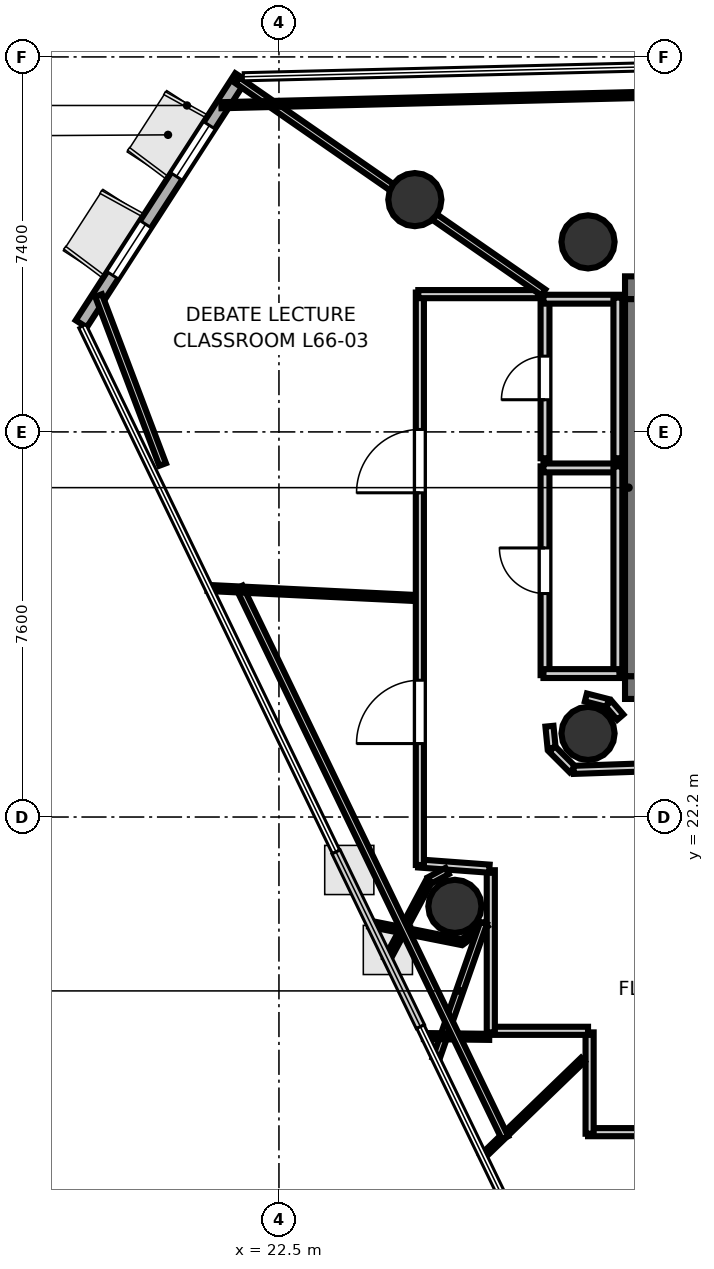
"""IFC4 building model, lengths in metres.
Left out: names, types, materials, properties, quantities, classifications, styles, units other than length and angle.
Written with IfcOpenShell. Run it as: python <this file> out.ifc"""

import sys

from ifc_helpers import new_model, si_unit, direction, frame, frame_2d, origin, origin_2d, place, context, subcontext, project, spatial, rectangle, hollow_circle, extrude, element, fill, save


model = new_model("IFC4")
c1 = context("Model", 3, precision=1e-05, world=origin(), true_north=direction((0.0, 1.0)))
c2 = subcontext(c1, "Body", "Model", "MODEL_VIEW")
j1 = project(units=[si_unit("LENGTHUNIT", "METRE"), si_unit("PLANEANGLEUNIT", "RADIAN")], contexts=[c1])
p1 = place(None, origin())
s1 = spatial("IfcSite", under=j1, at=p1, CompositionType="ELEMENT")
p2 = place(p1, origin())
s2 = spatial("IfcBuilding", under=s1, at=p2, CompositionType="ELEMENT")
p3 = place(p2, frame((0.0, 0.0, 257.5)))
s3 = spatial("IfcBuildingStorey", under=s2, at=p3, CompositionType="ELEMENT", Elevation=257.5)
p4 = place(p3, frame((29.33, 32.645, 0.0), z_axis=(0.0, 0.0, 1.0), x_axis=(1.0, 0.0, 0.0)))
e1 = element("IfcWall", 1, at=p4, inside=s3, PredefinedType="SHEAR", context=c2, shape_type="SweptSolid", body=[
    extrude(rectangle(XDim=10.52, YDim=0.45, at=frame_2d((5.26, 0.0))), origin(), (0.0, 0.0, 1.0), 3.52),
])
p5 = place(p4, frame((0.895, 0.0, 0.0)))
e2 = element("IfcOpeningElement", 2, at=p5, cuts=e1, PredefinedType="OPENING", context=c2, shape_type="SweptSolid", body=[
    extrude(rectangle(XDim=1.25, YDim=2.15, at=frame_2d((0.625, 1.075))), frame((0.0, 0.235, 0.0), z_axis=(0.0, -1.0, 0.0), x_axis=(1.0, 0.0, 0.0)), (0.0, 0.0, 1.0), 0.47),
])
p6 = place(p3, frame((29.33, 24.755, 0.0), z_axis=(0.0, 0.0, 1.0), x_axis=(1.0, 0.0, 0.0)))
e3 = element("IfcWall", 3, at=p6, inside=s3, PredefinedType="SHEAR", context=c2, shape_type="SweptSolid", body=[
    extrude(rectangle(XDim=10.52, YDim=0.45, at=frame_2d((5.26, 0.0))), origin(), (0.0, 0.0, 1.0), 3.52),
])
p7 = place(p6, frame((0.695, 0.0, 0.0)))
e4 = element("IfcOpeningElement", 4, at=p7, cuts=e3, PredefinedType="OPENING", context=c2, shape_type="SweptSolid", body=[
    extrude(rectangle(XDim=1.25, YDim=2.15, at=frame_2d((0.625, 1.075))), frame((0.0, 0.235, 0.0), z_axis=(0.0, -1.0, 0.0), x_axis=(1.0, 0.0, 0.0)), (0.0, 0.0, 1.0), 0.47),
])
p8 = place(p3, frame((29.555, 24.98, 0.0), z_axis=(0.0, 0.0, 1.0), x_axis=(0.0, 1.0, 0.0)))
e5 = element("IfcWall", 5, at=p8, inside=s3, PredefinedType="SHEAR", context=c2, shape_type="SweptSolid", body=[
    extrude(rectangle(XDim=7.44, YDim=0.45, at=frame_2d((3.72, 0.0))), origin(), (0.0, 0.0, 1.0), 3.52),
])
for number, where, z_axis, x_axis in (
    (6, (28.6, 33.55, 0.0), (0.0, 0.0, 1.0), (1.0, 0.0, 0.0)),
    (7, (28.6, 23.85, 0.0), (0.0, 0.0, 1.0), (1.0, 0.0, 0.0)),
    (8, (25.182, 34.384, 0.0), (0.0, 0.0, 1.0), (1.0, 0.0, 0.0)),
    (9, (25.972, 20.437, 0.0), (0.0, 0.0, 1.0), (1.0, 0.0, 0.0)),
):
    element("IfcColumn", number, at=place(p3, frame(where, z_axis=z_axis, x_axis=x_axis)), inside=s3, PredefinedType="COLUMN", context=c2, shape_type="SweptSolid", body=[
        extrude(hollow_circle(Radius=0.525, WallThickness=0.028, at=origin_2d()), origin(), (0.0, 0.0, 1.0), 3.7),
    ])
p9 = place(p3, frame((21.747, 36.807, 0.0), z_axis=(0.0, 0.0, 1.0), x_axis=(-0.542495743592, -0.84005855045, 0.0)))
e10 = element("IfcWall", 10, at=p9, inside=s3, PredefinedType="SOLIDWALL", context=c2, shape_type="SweptSolid", body=[
    extrude(rectangle(XDim=5.803, YDim=0.26, at=frame_2d((2.902, 0.0))), origin(), (0.0, 0.0, 1.0), 3.52),
])
p10 = place(p9, frame((1.141, 0.0, 0.9)))
e11 = element("IfcOpeningElement", 11, at=p10, cuts=e10, PredefinedType="OPENING", context=c2, shape_type="SweptSolid", body=[
    extrude(rectangle(XDim=1.2, YDim=2.0, at=frame_2d((0.6, 1.0))), frame((0.0, 0.14, 0.0), z_axis=(0.0, -1.0, 0.0), x_axis=(1.0, 0.0, 0.0)), (0.0, 0.0, 1.0), 0.28),
])
p11 = place(p9, frame((3.462, 0.0, 0.9)))
e12 = element("IfcOpeningElement", 12, at=p11, cuts=e10, PredefinedType="OPENING", context=c2, shape_type="SweptSolid", body=[
    extrude(rectangle(XDim=1.2, YDim=2.0, at=frame_2d((0.6, 1.0))), frame((0.0, 0.14, 0.0), z_axis=(0.0, -1.0, 0.0), x_axis=(1.0, 0.0, 0.0)), (0.0, 0.0, 1.0), 0.28),
])
p12 = place(p3, frame((27.751, 25.0, 0.0), z_axis=(0.0, 0.0, 1.0), x_axis=(0.0, 1.0, 0.0)))
e13 = element("IfcWall", 13, at=p12, inside=s3, PredefinedType="PLUMBINGWALL", context=c2, shape_type="SweptSolid", body=[
    extrude(rectangle(XDim=4.12, YDim=0.175, at=frame_2d((2.06, 0.0))), origin(), (0.0, 0.0, 1.0), 2.84),
])
p13 = place(p12, frame((1.61, 0.0, 0.0)))
e14 = element("IfcOpeningElement", 14, at=p13, cuts=e13, PredefinedType="OPENING", context=c2, shape_type="SweptSolid", body=[
    extrude(rectangle(XDim=0.9, YDim=2.1, at=frame_2d((0.45, 1.05))), frame((0.0, 0.097, 0.0), z_axis=(0.0, -1.0, 0.0), x_axis=(1.0, 0.0, 0.0)), (0.0, 0.0, 1.0), 0.195),
])
p14 = place(p3, frame((27.72, 29.089, 0.0), z_axis=(0.0, 0.0, 1.0), x_axis=(1.0, 0.0, 0.0)))
e15 = element("IfcWall", 15, at=p14, inside=s3, PredefinedType="PLUMBINGWALL", context=c2, shape_type="SweptSolid", body=[
    extrude(rectangle(XDim=1.5, YDim=0.175, at=frame_2d((0.75, 0.0))), origin(), (0.0, 0.0, 1.0), 2.84),
])
p15 = place(p3, frame((29.189, 29.12, 0.0), z_axis=(0.0, 0.0, 1.0), x_axis=(0.0, -1.0, 0.0)))
e16 = element("IfcWall", 16, at=p15, inside=s3, PredefinedType="PLUMBINGWALL", context=c2, shape_type="SweptSolid", body=[
    extrude(rectangle(XDim=4.12, YDim=0.175, at=frame_2d((2.06, 0.0))), origin(), (0.0, 0.0, 1.0), 2.84),
])
p16 = place(p3, frame((29.22, 25.031, 0.0), z_axis=(0.0, 0.0, 1.0), x_axis=(-1.0, 0.0, 0.0)))
e17 = element("IfcWall", 17, at=p16, inside=s3, PredefinedType="PLUMBINGWALL", context=c2, shape_type="SweptSolid", body=[
    extrude(rectangle(XDim=1.5, YDim=0.175, at=frame_2d((0.75, 0.0))), origin(), (0.0, 0.0, 1.0), 2.84),
])
p17 = place(p3, frame((27.751, 29.28, 0.0), z_axis=(0.0, 0.0, 1.0), x_axis=(0.0, 1.0, 0.0)))
e18 = element("IfcWall", 18, at=p17, inside=s3, PredefinedType="PLUMBINGWALL", context=c2, shape_type="SweptSolid", body=[
    extrude(rectangle(XDim=3.17, YDim=0.175, at=frame_2d((1.585, 0.0))), origin(), (0.0, 0.0, 1.0), 2.84),
])
p18 = place(p17, frame((1.155, 0.0, 0.0)))
e19 = element("IfcOpeningElement", 19, at=p18, cuts=e18, PredefinedType="OPENING", context=c2, shape_type="SweptSolid", body=[
    extrude(rectangle(XDim=0.86, YDim=2.05, at=frame_2d((0.43, 1.025))), frame((0.0, 0.097, 0.0), z_axis=(0.0, -1.0, 0.0), x_axis=(1.0, 0.0, 0.0)), (0.0, 0.0, 1.0), 0.195),
])
p19 = place(p3, frame((27.72, 32.419, 0.0), z_axis=(0.0, 0.0, 1.0), x_axis=(1.0, 0.0, 0.0)))
e20 = element("IfcWall", 20, at=p19, inside=s3, PredefinedType="PLUMBINGWALL", context=c2, shape_type="SweptSolid", body=[
    extrude(rectangle(XDim=1.5, YDim=0.175, at=frame_2d((0.75, 0.0))), origin(), (0.0, 0.0, 1.0), 2.84),
])
p20 = place(p3, frame((29.189, 32.45, 0.0), z_axis=(0.0, 0.0, 1.0), x_axis=(0.0, -1.0, 0.0)))
e21 = element("IfcWall", 21, at=p20, inside=s3, PredefinedType="PLUMBINGWALL", context=c2, shape_type="SweptSolid", body=[
    extrude(rectangle(XDim=3.17, YDim=0.175, at=frame_2d((1.585, 0.0))), origin(), (0.0, 0.0, 1.0), 2.84),
])
p21 = place(p3, frame((29.236, 24.17, 0.0), z_axis=(0.0, 0.0, 1.0), x_axis=(-0.652260263346, 0.757995084984, 0.0)))
e22 = element("IfcWall", 22, at=p21, inside=s3, PredefinedType="PARTITIONING", context=c2, shape_type="SweptSolid", body=[
    extrude(rectangle(XDim=0.355, YDim=0.16, at=frame_2d((0.178, 0.0))), origin(), (0.0, 0.0, 1.0), 2.84),
])
p22 = place(p3, frame((28.988, 24.45, 0.0), z_axis=(0.0, 0.0, 1.0), x_axis=(-0.968704505916, 0.248216800836, 0.0)))
e23 = element("IfcWall", 23, at=p22, inside=s3, PredefinedType="PARTITIONING", context=c2, shape_type="SweptSolid", body=[
    extrude(rectangle(XDim=0.445, YDim=0.16, at=frame_2d((0.222, 0.0))), origin(), (0.0, 0.0, 1.0), 2.84),
])
p23 = place(p3, frame((27.838, 23.992, 0.0), z_axis=(0.0, 0.0, 1.0), x_axis=(0.098273407977, -0.995159453196, 0.0)))
e24 = element("IfcWall", 24, at=p23, inside=s3, PredefinedType="PARTITIONING", context=c2, shape_type="SweptSolid", body=[
    extrude(rectangle(XDim=0.432, YDim=0.16, at=frame_2d((0.216, 0.0))), origin(), (0.0, 0.0, 1.0), 2.84),
])
p24 = place(p3, frame((27.89, 23.543, 0.0), z_axis=(0.0, 0.0, 1.0), x_axis=(0.707106781187, -0.707106781187, 0.0)))
e25 = element("IfcWall", 25, at=p24, inside=s3, PredefinedType="PARTITIONING", context=c2, shape_type="SweptSolid", body=[
    extrude(rectangle(XDim=0.57, YDim=0.16, at=frame_2d((0.285, 0.0))), origin(), (0.0, 0.0, 1.0), 2.84),
])
p25 = place(p3, frame((28.316, 23.131, 0.0), z_axis=(0.0, 0.0, 1.0), x_axis=(0.999405342193, 0.034481328227, 0.0)))
e26 = element("IfcWall", 26, at=p25, inside=s3, PredefinedType="PARTITIONING", context=c2, shape_type="SweptSolid", body=[
    extrude(rectangle(XDim=1.324, YDim=0.16, at=frame_2d((0.662, 0.0))), origin(), (0.0, 0.0, 1.0), 2.84),
])
p26 = place(p3, frame((43.731, 15.981, 0.0), z_axis=(0.0, 0.0, 1.0), x_axis=(-1.0, 0.0, 0.0)))
e27 = element("IfcWall", 27, at=p26, inside=s3, PredefinedType="PARTITIONING", context=c2, shape_type="SweptSolid", body=[
    extrude(rectangle(XDim=15.131, YDim=0.16, at=frame_2d((7.565, 0.0))), origin(), (0.0, 0.0, 1.0), 2.84),
])
p27 = place(p26, frame((6.965, 0.0, 0.0)))
e28 = element("IfcOpeningElement", 28, at=p27, cuts=e27, PredefinedType="OPENING", context=c2, shape_type="SweptSolid", body=[
    extrude(rectangle(XDim=1.25, YDim=2.2, at=frame_2d((0.625, 1.1))), frame((0.0, 0.09, 0.0), z_axis=(0.0, -1.0, 0.0), x_axis=(1.0, 0.0, 0.0)), (0.0, 0.0, 1.0), 0.18),
])
p28 = place(p3, frame((28.631, 15.95, 0.0), z_axis=(0.0, 0.0, 1.0), x_axis=(0.0, 1.0, 0.0)))
e29 = element("IfcWall", 29, at=p28, inside=s3, PredefinedType="PARTITIONING", context=c2, shape_type="SweptSolid", body=[
    extrude(rectangle(XDim=2.0, YDim=0.16, at=frame_2d((1.0, 0.0))), origin(), (0.0, 0.0, 1.0), 2.84),
])
p29 = place(p3, frame((28.6, 17.981, 0.0), z_axis=(0.0, 0.0, 1.0), x_axis=(-1.0, 0.0, 0.0)))
e30 = element("IfcWall", 30, at=p29, inside=s3, PredefinedType="PARTITIONING", context=c2, shape_type="SweptSolid", body=[
    extrude(rectangle(XDim=1.95, YDim=0.16, at=frame_2d((0.975, 0.0))), origin(), (0.0, 0.0, 1.0), 2.84),
])
p30 = place(p3, frame((26.681, 17.95, 0.0), z_axis=(0.0, 0.0, 1.0), x_axis=(0.0, 1.0, 0.0)))
e31 = element("IfcWall", 31, at=p30, inside=s3, PredefinedType="PARTITIONING", context=c2, shape_type="SweptSolid", body=[
    extrude(rectangle(XDim=3.2, YDim=0.16, at=frame_2d((1.6, 0.0))), origin(), (0.0, 0.0, 1.0), 2.84),
])
p31 = place(p3, frame((26.652, 21.181, 0.0), z_axis=(0.0, 0.0, 1.0), x_axis=(-0.997303696291, 0.073384857861, 0.0)))
e32 = element("IfcWall", 32, at=p31, inside=s3, PredefinedType="PARTITIONING", context=c2, shape_type="SweptSolid", body=[
    extrude(rectangle(XDim=1.404, YDim=0.16, at=frame_2d((0.702, 0.0))), origin(), (0.0, 0.0, 1.0), 2.84),
])
p32 = place(p3, frame((25.281, 21.253, 0.0), z_axis=(0.0, 0.0, 1.0), x_axis=(0.0, 1.0, 0.0)))
e33 = element("IfcWall", 33, at=p32, inside=s3, PredefinedType="PARTITIONING", context=c2, shape_type="SweptSolid", body=[
    extrude(rectangle(XDim=11.297, YDim=0.16, at=frame_2d((5.648, 0.0))), origin(), (0.0, 0.0, 1.0), 2.84),
])
p33 = place(p32, frame((2.396, 0.0, 0.0)))
e34 = element("IfcOpeningElement", 34, at=p33, cuts=e33, PredefinedType="OPENING", context=c2, shape_type="SweptSolid", body=[
    extrude(rectangle(XDim=1.25, YDim=2.2, at=frame_2d((0.625, 1.1))), frame((0.0, 0.09, 0.0), z_axis=(0.0, -1.0, 0.0), x_axis=(1.0, 0.0, 0.0)), (0.0, 0.0, 1.0), 0.18),
])
p34 = place(p32, frame((7.345, 0.0, 0.0)))
e35 = element("IfcOpeningElement", 35, at=p34, cuts=e33, PredefinedType="OPENING", context=c2, shape_type="SweptSolid", body=[
    extrude(rectangle(XDim=1.25, YDim=2.2, at=frame_2d((0.625, 1.1))), frame((0.0, 0.09, 0.0), z_axis=(0.0, -1.0, 0.0), x_axis=(1.0, 0.0, 0.0)), (0.0, 0.0, 1.0), 0.18),
])
p35 = place(p3, frame((25.25, 32.519, 0.0), z_axis=(0.0, 0.0, 1.0), x_axis=(1.0, 0.0, 0.0)))
e36 = element("IfcWall", 36, at=p35, inside=s3, PredefinedType="PARTITIONING", context=c2, shape_type="SweptSolid", body=[
    extrude(rectangle(XDim=2.37, YDim=0.16, at=frame_2d((1.185, 0.0))), origin(), (0.0, 0.0, 1.0), 2.84),
])
p36 = place(p3, frame((25.819, 21.135, 0.0), z_axis=(0.0, 0.0, 1.0), x_axis=(-0.880749970322, -0.473581555571, 0.0)))
e37 = element("IfcWall", 37, at=p36, inside=s3, PredefinedType="PARTITIONING", context=c2, shape_type="SweptSolid", body=[
    extrude(rectangle(XDim=0.393, YDim=0.14, at=frame_2d((0.197, 0.0))), origin(), (0.0, 0.0, 1.0), 2.84),
])
p37 = place(p3, frame((25.46, 20.936, 0.0), z_axis=(0.0, 0.0, 1.0), x_axis=(-0.471491142695, -0.881870796863, 0.0)))
e38 = element("IfcWall", 38, at=p37, inside=s3, PredefinedType="PARTITIONING", context=c2, shape_type="SweptSolid", body=[
    extrude(rectangle(XDim=1.754, YDim=0.12, at=frame_2d((0.877, 0.0))), origin(), (0.0, 0.0, 1.0), 2.84),
])
p38 = place(p3, frame((24.294, 20.094, 0.0), z_axis=(0.0, 0.0, 1.0), x_axis=(0.980819637786, -0.194917516229, 0.0)))
e39 = element("IfcWall", 39, at=p38, inside=s3, PredefinedType="PARTITIONING", context=c2, shape_type="SweptSolid", body=[
    extrude(rectangle(XDim=1.841, YDim=0.12, at=frame_2d((0.921, 0.0))), origin(), (0.0, 0.0, 1.0), 2.84),
])
p39 = place(p3, frame((26.124, 19.74, 0.0), z_axis=(0.0, 0.0, 1.0), x_axis=(0.803130617249, 0.595802997339, 0.0)))
e40 = element("IfcWall", 40, at=p39, inside=s3, PredefinedType="PARTITIONING", context=c2, shape_type="SweptSolid", body=[
    extrude(rectangle(XDim=0.578, YDim=0.105, at=frame_2d((0.289, 0.0))), origin(), (0.0, 0.0, 1.0), 2.84),
])
p40 = place(p3, frame((26.539, 20.109, 0.0), z_axis=(0.0, 0.0, 1.0), x_axis=(-0.331161515891, -0.94357408315, 0.0)))
e41 = element("IfcWall", 41, at=p40, inside=s3, PredefinedType="PARTITIONING", context=c2, shape_type="SweptSolid", body=[
    extrude(rectangle(XDim=2.842, YDim=0.14, at=frame_2d((1.421, 0.0))), origin(), (0.0, 0.0, 1.0), 2.84),
])
p41 = place(p3, frame((25.361, 17.877, 0.0), z_axis=(0.0, 0.0, 1.0), x_axis=(0.999926518374, -0.012122617385, 0.0)))
e42 = element("IfcWall", 42, at=p41, inside=s3, PredefinedType="PARTITIONING", context=c2, shape_type="SweptSolid", body=[
    extrude(rectangle(XDim=1.289, YDim=0.12, at=frame_2d((0.645, 0.0))), origin(), (0.0, 0.0, 1.0), 2.84),
])
p42 = place(p3, frame((28.499, 17.412, 0.0), z_axis=(0.0, 0.0, 1.0), x_axis=(-0.719456270986, -0.694537741335, 0.0)))
e43 = element("IfcWall", 43, at=p42, inside=s3, PredefinedType="PARTITIONING", context=c2, shape_type="SweptSolid", body=[
    extrude(rectangle(XDim=2.763, YDim=0.105, at=frame_2d((1.381, 0.0))), origin(), (0.0, 0.0, 1.0), 2.84),
])
p43 = place(p3, frame((26.961, 15.871, 0.0), z_axis=(0.0, 0.0, 1.0), x_axis=(-0.434614939442, 0.90061637472, 0.0)))
e44 = element("IfcWall", 44, at=p43, inside=s3, PredefinedType="PARTITIONING", context=c2, shape_type="SweptSolid", body=[
    extrude(rectangle(XDim=12.064, YDim=0.14, at=frame_2d((6.032, 0.0))), origin(), (0.0, 0.0, 1.0), 2.84),
])
p44 = place(p3, frame((21.094, 26.72, 0.0), z_axis=(0.0, 0.0, 1.0), x_axis=(0.998832933372, -0.048298770282, 0.0)))
e45 = element("IfcWall", 45, at=p44, inside=s3, PredefinedType="PARTITIONING", context=c2, shape_type="SweptSolid", body=[
    extrude(rectangle(XDim=4.079, YDim=0.12, at=frame_2d((2.04, 0.0))), origin(), (0.0, 0.0, 1.0), 2.84),
])
p45 = place(p3, frame((27.718, 32.553, 0.0), z_axis=(0.0, 0.0, 1.0), x_axis=(-0.821796079358, 0.569781716056, 0.0)))
e46 = element("IfcWall", 46, at=p45, inside=s3, PredefinedType="PARTITIONING", context=c2, shape_type="SweptSolid", body=[
    extrude(rectangle(XDim=7.348, YDim=0.14, at=frame_2d((3.674, 0.0))), origin(), (0.0, 0.0, 1.0), 2.84),
])
p46 = place(p3, frame((21.365, 36.247, 0.0), z_axis=(0.0, 0.0, 1.0), x_axis=(0.999698298545, 0.024562407988, 0.0)))
e47 = element("IfcWall", 47, at=p46, inside=s3, PredefinedType="PARTITIONING", context=c2, shape_type="SweptSolid", body=[
    extrude(rectangle(XDim=35.325, YDim=0.12, at=frame_2d((17.663, 0.0))), origin(), (0.0, 0.0, 1.0), 2.84),
])
p47 = place(p3, frame((20.204, 29.157, 0.0), z_axis=(0.0, 0.0, 1.0), x_axis=(-0.354383944094, 0.935100005437, 0.0)))
e48 = element("IfcWall", 48, at=p47, inside=s3, PredefinedType="PARTITIONING", context=c2, shape_type="SweptSolid", body=[
    extrude(rectangle(XDim=3.567, YDim=0.14, at=frame_2d((1.784, 0.0))), origin(), (0.0, 0.0, 1.0), 2.84),
])
p48 = place(p13, origin())
e49 = element("IfcDoor", 49, at=p48, inside=s3, OperationType="SINGLE_SWING_RIGHT", PredefinedType="DOOR", context=c2, shape_type="SweptSolid", body=[
    extrude(rectangle(XDim=0.9, YDim=2.1, at=frame_2d((0.45, 1.05))), frame((0.0, 0.025, 0.0), z_axis=(0.0, -1.0, 0.0), x_axis=(1.0, 0.0, 0.0)), (0.0, 0.0, 1.0), 0.05),
])
fill(e14, e49)
p49 = place(p18, origin())
e50 = element("IfcDoor", 50, at=p49, inside=s3, OperationType="SINGLE_SWING_LEFT", PredefinedType="DOOR", context=c2, shape_type="SweptSolid", body=[
    extrude(rectangle(XDim=0.86, YDim=2.05, at=frame_2d((0.43, 1.025))), frame((0.0, 0.025, 0.0), z_axis=(0.0, -1.0, 0.0), x_axis=(1.0, 0.0, 0.0)), (0.0, 0.0, 1.0), 0.05),
])
fill(e19, e50)
p50 = place(p33, origin())
e51 = element("IfcDoor", 51, at=p50, inside=s3, OperationType="SINGLE_SWING_LEFT", PredefinedType="DOOR", context=c2, shape_type="SweptSolid", body=[
    extrude(rectangle(XDim=1.25, YDim=2.2, at=frame_2d((0.625, 1.1))), frame((0.0, 0.025, 0.0), z_axis=(0.0, -1.0, 0.0), x_axis=(1.0, 0.0, 0.0)), (0.0, 0.0, 1.0), 0.05),
])
fill(e34, e51)
p51 = place(p34, origin())
e52 = element("IfcDoor", 52, at=p51, inside=s3, OperationType="SINGLE_SWING_LEFT", PredefinedType="DOOR", context=c2, shape_type="SweptSolid", body=[
    extrude(rectangle(XDim=1.25, YDim=2.2, at=frame_2d((0.625, 1.1))), frame((0.0, 0.025, 0.0), z_axis=(0.0, -1.0, 0.0), x_axis=(1.0, 0.0, 0.0)), (0.0, 0.0, 1.0), 0.05),
])
fill(e35, e52)
p52 = place(p10, origin())
e53 = element("IfcWindow", 53, at=p52, inside=s3, PartitioningType="SINGLE_PANEL", PredefinedType="WINDOW", context=c2, shape_type="SweptSolid", body=[
    extrude(rectangle(XDim=1.2, YDim=2.0, at=frame_2d((0.6, 1.0))), frame((0.0, 0.03, 0.0), z_axis=(0.0, -1.0, 0.0), x_axis=(1.0, 0.0, 0.0)), (0.0, 0.0, 1.0), 0.06),
])
fill(e11, e53)
p53 = place(p11, origin())
e54 = element("IfcWindow", 54, at=p53, inside=s3, PartitioningType="SINGLE_PANEL", PredefinedType="WINDOW", context=c2, shape_type="SweptSolid", body=[
    extrude(rectangle(XDim=1.2, YDim=2.0, at=frame_2d((0.6, 1.0))), frame((0.0, 0.03, 0.0), z_axis=(0.0, -1.0, 0.0), x_axis=(1.0, 0.0, 0.0)), (0.0, 0.0, 1.0), 0.06),
])
fill(e12, e54)
save(model, sys.argv[1])
